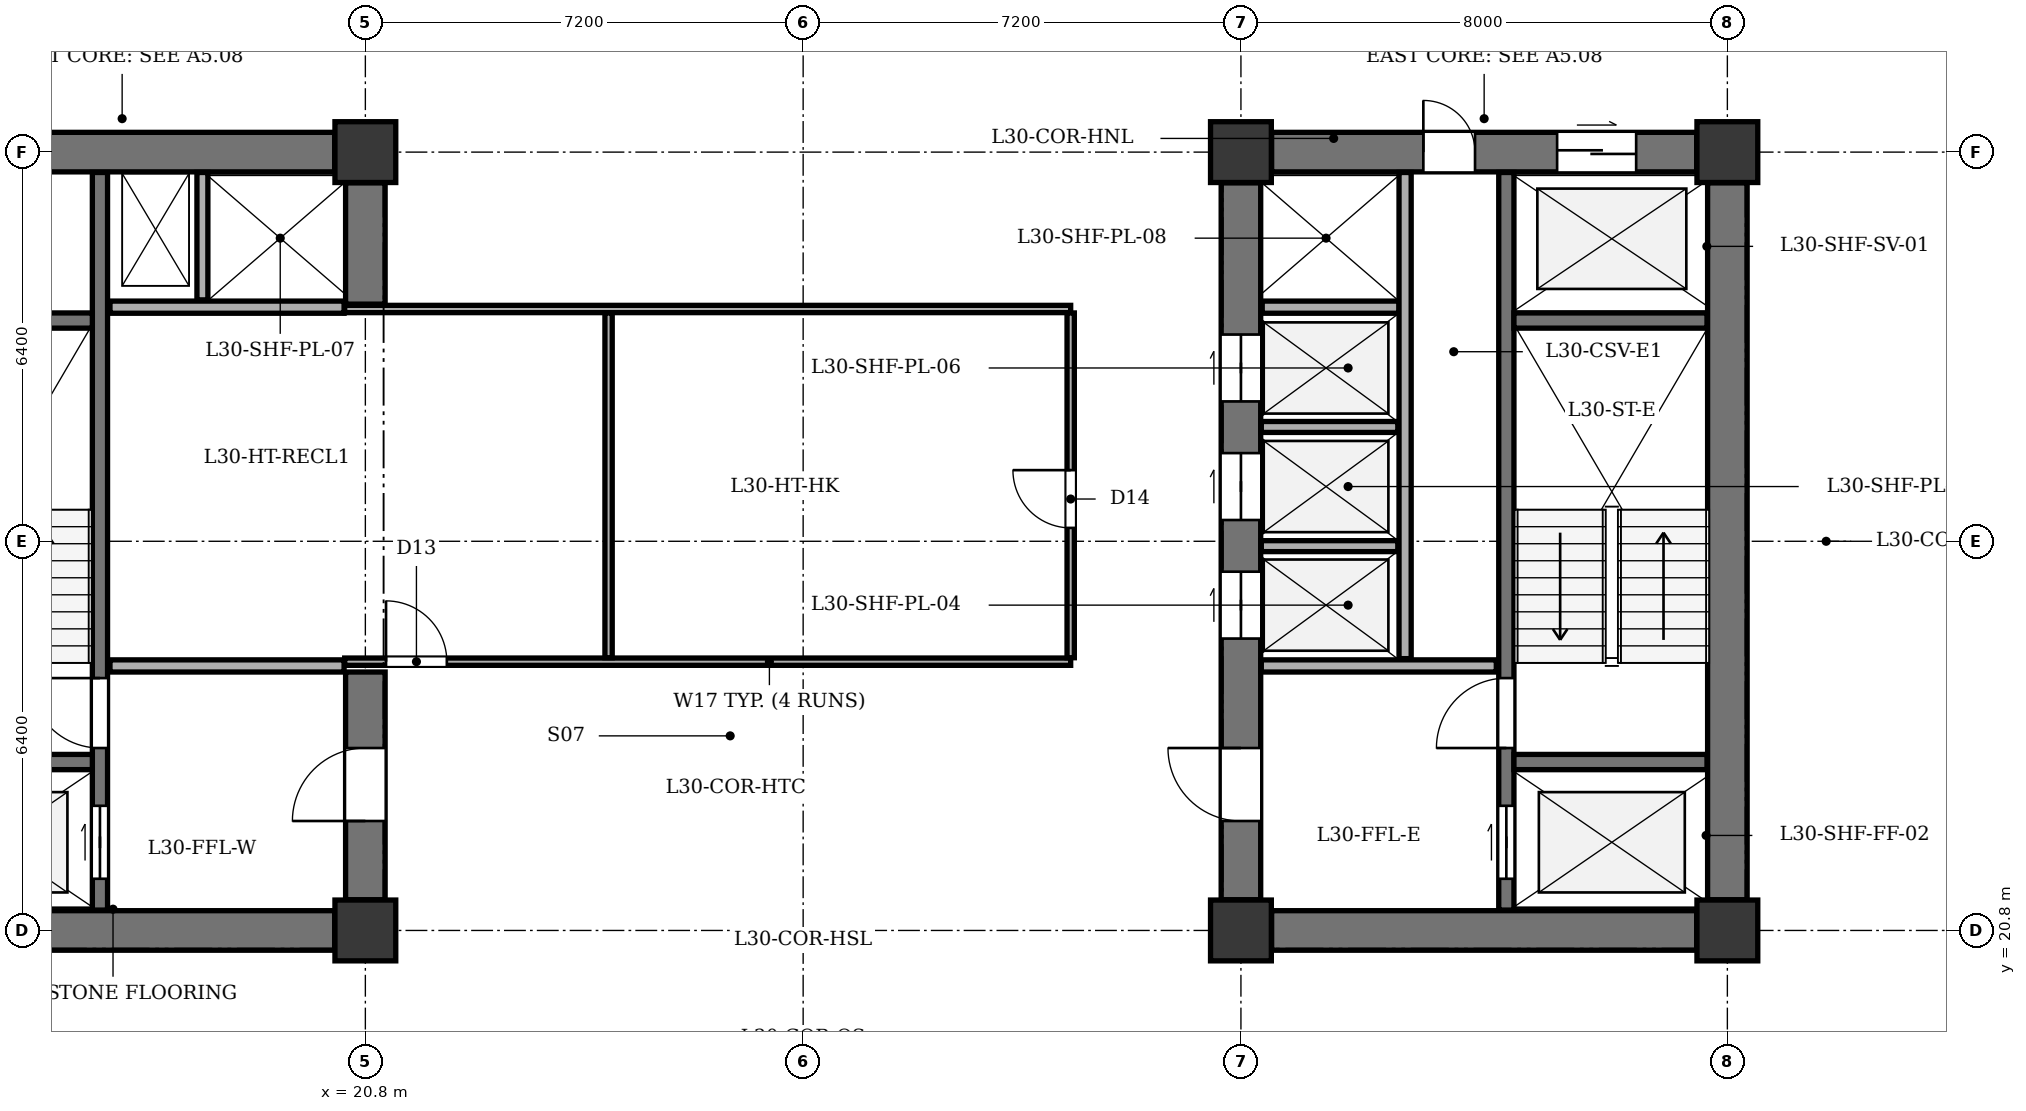
"""IFC4 building model, lengths in metres.
Left out: names, types, materials, properties, quantities, classifications, styles, units other than length and angle.
Written with IfcOpenShell. Run it as: python <this file> out.ifc"""

import sys

from ifc_helpers import new_model, si_unit, direction, frame, frame_2d, origin, origin_2d, place, context, subcontext, project, spatial, rectangle, extrude, element, fill, save


model = new_model("IFC4")
c1 = context("Model", 3, precision=1e-05, world=origin(), true_north=direction((0.0, 1.0)))
c2 = subcontext(c1, "Body", "Model", "MODEL_VIEW")
j1 = project(units=[si_unit("LENGTHUNIT", "METRE"), si_unit("PLANEANGLEUNIT", "RADIAN")], contexts=[c1])
p1 = place(None, origin())
s1 = spatial("IfcSite", under=j1, at=p1, CompositionType="ELEMENT")
p2 = place(p1, origin())
s2 = spatial("IfcBuilding", under=s1, at=p2, CompositionType="ELEMENT")
p3 = place(p2, frame((0.0, 0.0, 123.8)))
s3 = spatial("IfcBuildingStorey", under=s2, at=p3, CompositionType="ELEMENT", Elevation=123.8)
for number, where, z_axis, x_axis in (
    (1, (20.8, 20.8, 0.0), (0.0, 0.0, 1.0), (1.0, 0.0, 0.0)),
    (2, (20.8, 33.6, 0.0), (0.0, 0.0, 1.0), (1.0, 0.0, 0.0)),
    (3, (35.2, 20.8, 0.0), (0.0, 0.0, 1.0), (1.0, 0.0, 0.0)),
    (4, (43.2, 20.8, 0.0), (0.0, 0.0, 1.0), (1.0, 0.0, 0.0)),
    (5, (35.2, 33.6, 0.0), (0.0, 0.0, 1.0), (1.0, 0.0, 0.0)),
    (6, (43.2, 33.6, 0.0), (0.0, 0.0, 1.0), (1.0, 0.0, 0.0)),
):
    element("IfcColumn", number, at=place(p3, frame(where, z_axis=z_axis, x_axis=x_axis)), inside=s3, PredefinedType="COLUMN", context=c2, shape_type="SweptSolid", body=[
        extrude(rectangle(XDim=1.0, YDim=1.0, at=origin_2d()), origin(), (0.0, 0.0, 1.0), 3.5),
    ])
p4 = place(p3, frame((13.305, 20.8, 0.0), z_axis=(0.0, 0.0, 1.0), x_axis=(1.0, 0.0, 0.0)))
e7 = element("IfcWall", 7, at=p4, inside=s3, PredefinedType="SHEAR", context=c2, shape_type="SweptSolid", body=[
    extrude(rectangle(XDim=6.99, YDim=0.65, at=frame_2d((3.495, 0.0))), origin(), (0.0, 0.0, 1.0), 3.2),
])
p5 = place(p3, frame((13.305, 33.6, 0.0), z_axis=(0.0, 0.0, 1.0), x_axis=(1.0, 0.0, 0.0)))
e8 = element("IfcWall", 8, at=p5, inside=s3, PredefinedType="SHEAR", context=c2, shape_type="SweptSolid", body=[
    extrude(rectangle(XDim=6.99, YDim=0.65, at=frame_2d((3.495, 0.0))), origin(), (0.0, 0.0, 1.0), 3.2),
])
p6 = place(p5, frame((1.095, 0.0, 0.0)))
e9 = element("IfcOpeningElement", 9, at=p6, cuts=e8, PredefinedType="OPENING", context=c2, shape_type="SweptSolid", body=[
    extrude(rectangle(XDim=0.85, YDim=2.02, at=frame_2d((0.425, 1.01))), frame((0.0, 0.335, 0.0), z_axis=(0.0, -1.0, 0.0), x_axis=(1.0, 0.0, 0.0)), (0.0, 0.0, 1.0), 0.67),
])
p7 = place(p3, frame((20.8, 21.305, 0.0), z_axis=(0.0, 0.0, 1.0), x_axis=(0.0, 1.0, 0.0)))
e10 = element("IfcWall", 10, at=p7, inside=s3, PredefinedType="SHEAR", context=c2, shape_type="SweptSolid", body=[
    extrude(rectangle(XDim=3.745, YDim=0.65, at=frame_2d((1.873, 0.0))), origin(), (0.0, 0.0, 1.0), 3.2),
])
p8 = place(p7, frame((1.295, 0.0, 0.0)))
e11 = element("IfcOpeningElement", 11, at=p8, cuts=e10, PredefinedType="OPENING", context=c2, shape_type="SweptSolid", body=[
    extrude(rectangle(XDim=1.2, YDim=2.15, at=frame_2d((0.6, 1.075))), frame((0.0, 0.335, 0.0), z_axis=(0.0, -1.0, 0.0), x_axis=(1.0, 0.0, 0.0)), (0.0, 0.0, 1.0), 0.67),
])
p9 = place(p3, frame((20.8, 31.1, 0.0), z_axis=(0.0, 0.0, 1.0), x_axis=(0.0, 1.0, 0.0)))
e12 = element("IfcWall", 12, at=p9, inside=s3, PredefinedType="SHEAR", context=c2, shape_type="SweptSolid", body=[
    extrude(rectangle(XDim=1.995, YDim=0.65, at=frame_2d((0.998, 0.0))), origin(), (0.0, 0.0, 1.0), 3.2),
])
p10 = place(p3, frame((16.435, 21.135, 0.0), z_axis=(0.0, 0.0, 1.0), x_axis=(0.0, 1.0, 0.0)))
e13 = element("IfcWall", 13, at=p10, inside=s3, PredefinedType="SHEAR", context=c2, shape_type="SweptSolid", body=[
    extrude(rectangle(XDim=12.13, YDim=0.25, at=frame_2d((6.065, 0.0))), origin(), (0.0, 0.0, 1.0), 3.2),
])
p11 = place(p10, frame((0.515, 0.0, 0.0)))
e14 = element("IfcOpeningElement", 14, at=p11, cuts=e13, PredefinedType="OPENING", context=c2, shape_type="SweptSolid", body=[
    extrude(rectangle(XDim=1.2, YDim=2.15, at=frame_2d((0.6, 1.075))), frame((0.0, 0.135, 0.0), z_axis=(0.0, -1.0, 0.0), x_axis=(1.0, 0.0, 0.0)), (0.0, 0.0, 1.0), 0.27),
])
p12 = place(p10, frame((2.665, 0.0, 0.0)))
e15 = element("IfcOpeningElement", 15, at=p12, cuts=e13, PredefinedType="OPENING", context=c2, shape_type="SweptSolid", body=[
    extrude(rectangle(XDim=1.15, YDim=2.15, at=frame_2d((0.575, 1.075))), frame((0.0, 0.135, 0.0), z_axis=(0.0, -1.0, 0.0), x_axis=(1.0, 0.0, 0.0)), (0.0, 0.0, 1.0), 0.27),
])
for number, where, z_axis, x_axis in (
    (16, (13.135, 23.57, 0.0), (0.0, 0.0, 1.0), (1.0, 0.0, 0.0)),
    (17, (13.135, 30.83, 0.0), (0.0, 0.0, 1.0), (1.0, 0.0, 0.0)),
):
    element("IfcWall", number, at=place(p3, frame(where, z_axis=z_axis, x_axis=x_axis)), inside=s3, PredefinedType="SHEAR", context=c2, shape_type="SweptSolid", body=[
        extrude(rectangle(XDim=3.175, YDim=0.25, at=frame_2d((1.587, 0.0))), origin(), (0.0, 0.0, 1.0), 3.2),
    ])
for number, where, z_axis, x_axis in (
    (18, (16.6, 25.15, 0.0), (0.0, 0.0, 1.0), (1.0, 0.0, 0.0)),
    (19, (16.6, 31.05, 0.0), (0.0, 0.0, 1.0), (1.0, 0.0, 0.0)),
):
    element("IfcWall", number, at=place(p3, frame(where, z_axis=z_axis, x_axis=x_axis)), inside=s3, PredefinedType="SOLIDWALL", context=c2, shape_type="SweptSolid", body=[
        extrude(rectangle(XDim=3.85, YDim=0.2, at=frame_2d((1.925, 0.0))), origin(), (0.0, 0.0, 1.0), 3.2),
    ])
p13 = place(p3, frame((18.12, 31.17, 0.0), z_axis=(0.0, 0.0, 1.0), x_axis=(0.0, 1.0, 0.0)))
e20 = element("IfcWall", 20, at=p13, inside=s3, PredefinedType="PARTITIONING", context=c2, shape_type="SweptSolid", body=[
    extrude(rectangle(XDim=2.095, YDim=0.18, at=frame_2d((1.047, 0.0))), origin(), (0.0, 0.0, 1.0), 3.2),
])
p14 = place(p3, frame((43.2, 21.305, 0.0), z_axis=(0.0, 0.0, 1.0), x_axis=(0.0, 1.0, 0.0)))
e21 = element("IfcWall", 21, at=p14, inside=s3, PredefinedType="SHEAR", context=c2, shape_type="SweptSolid", body=[
    extrude(rectangle(XDim=11.79, YDim=0.65, at=frame_2d((5.895, 0.0))), origin(), (0.0, 0.0, 1.0), 3.2),
])
p15 = place(p3, frame((35.705, 20.8, 0.0), z_axis=(0.0, 0.0, 1.0), x_axis=(1.0, 0.0, 0.0)))
e22 = element("IfcWall", 22, at=p15, inside=s3, PredefinedType="SHEAR", context=c2, shape_type="SweptSolid", body=[
    extrude(rectangle(XDim=6.99, YDim=0.65, at=frame_2d((3.495, 0.0))), origin(), (0.0, 0.0, 1.0), 3.2),
])
p16 = place(p3, frame((35.705, 33.6, 0.0), z_axis=(0.0, 0.0, 1.0), x_axis=(1.0, 0.0, 0.0)))
e23 = element("IfcWall", 23, at=p16, inside=s3, PredefinedType="SHEAR", context=c2, shape_type="SweptSolid", body=[
    extrude(rectangle(XDim=6.99, YDim=0.65, at=frame_2d((3.495, 0.0))), origin(), (0.0, 0.0, 1.0), 3.2),
])
p17 = place(p16, frame((4.695, 0.0, 0.0)))
e24 = element("IfcOpeningElement", 24, at=p17, cuts=e23, PredefinedType="OPENING", context=c2, shape_type="SweptSolid", body=[
    extrude(rectangle(XDim=1.3, YDim=2.15, at=frame_2d((0.65, 1.075))), frame((0.0, 0.335, 0.0), z_axis=(0.0, -1.0, 0.0), x_axis=(1.0, 0.0, 0.0)), (0.0, 0.0, 1.0), 0.67),
])
p18 = place(p16, frame((2.495, 0.0, 0.0)))
e25 = element("IfcOpeningElement", 25, at=p18, cuts=e23, PredefinedType="OPENING", context=c2, shape_type="SweptSolid", body=[
    extrude(rectangle(XDim=0.85, YDim=2.02, at=frame_2d((0.425, 1.01))), frame((0.0, 0.335, 0.0), z_axis=(0.0, -1.0, 0.0), x_axis=(1.0, 0.0, 0.0)), (0.0, 0.0, 1.0), 0.67),
])
p19 = place(p3, frame((35.2, 21.305, 0.0), z_axis=(0.0, 0.0, 1.0), x_axis=(0.0, 1.0, 0.0)))
e26 = element("IfcWall", 26, at=p19, inside=s3, PredefinedType="SHEAR", context=c2, shape_type="SweptSolid", body=[
    extrude(rectangle(XDim=11.79, YDim=0.65, at=frame_2d((5.895, 0.0))), origin(), (0.0, 0.0, 1.0), 3.2),
])
p20 = place(p19, frame((1.295, 0.0, 0.0)))
e27 = element("IfcOpeningElement", 27, at=p20, cuts=e26, PredefinedType="OPENING", context=c2, shape_type="SweptSolid", body=[
    extrude(rectangle(XDim=1.2, YDim=2.15, at=frame_2d((0.6, 1.075))), frame((0.0, 0.335, 0.0), z_axis=(0.0, -1.0, 0.0), x_axis=(1.0, 0.0, 0.0)), (0.0, 0.0, 1.0), 0.67),
])
p21 = place(p19, frame((4.295, 0.0, 0.0)))
e28 = element("IfcOpeningElement", 28, at=p21, cuts=e26, PredefinedType="OPENING", context=c2, shape_type="SweptSolid", body=[
    extrude(rectangle(XDim=1.1, YDim=2.1, at=frame_2d((0.55, 1.05))), frame((0.0, 0.335, 0.0), z_axis=(0.0, -1.0, 0.0), x_axis=(1.0, 0.0, 0.0)), (0.0, 0.0, 1.0), 0.67),
])
p22 = place(p19, frame((6.245, 0.0, 0.0)))
e29 = element("IfcOpeningElement", 29, at=p22, cuts=e26, PredefinedType="OPENING", context=c2, shape_type="SweptSolid", body=[
    extrude(rectangle(XDim=1.1, YDim=2.1, at=frame_2d((0.55, 1.05))), frame((0.0, 0.335, 0.0), z_axis=(0.0, -1.0, 0.0), x_axis=(1.0, 0.0, 0.0)), (0.0, 0.0, 1.0), 0.67),
])
p23 = place(p19, frame((8.195, 0.0, 0.0)))
e30 = element("IfcOpeningElement", 30, at=p23, cuts=e26, PredefinedType="OPENING", context=c2, shape_type="SweptSolid", body=[
    extrude(rectangle(XDim=1.1, YDim=2.1, at=frame_2d((0.55, 1.05))), frame((0.0, 0.335, 0.0), z_axis=(0.0, -1.0, 0.0), x_axis=(1.0, 0.0, 0.0)), (0.0, 0.0, 1.0), 0.67),
])
p24 = place(p3, frame((39.565, 21.135, 0.0), z_axis=(0.0, 0.0, 1.0), x_axis=(0.0, 1.0, 0.0)))
e31 = element("IfcWall", 31, at=p24, inside=s3, PredefinedType="SHEAR", context=c2, shape_type="SweptSolid", body=[
    extrude(rectangle(XDim=12.13, YDim=0.25, at=frame_2d((6.065, 0.0))), origin(), (0.0, 0.0, 1.0), 3.2),
])
p25 = place(p24, frame((0.515, 0.0, 0.0)))
e32 = element("IfcOpeningElement", 32, at=p25, cuts=e31, PredefinedType="OPENING", context=c2, shape_type="SweptSolid", body=[
    extrude(rectangle(XDim=1.2, YDim=2.15, at=frame_2d((0.6, 1.075))), frame((0.0, 0.135, 0.0), z_axis=(0.0, -1.0, 0.0), x_axis=(1.0, 0.0, 0.0)), (0.0, 0.0, 1.0), 0.27),
])
p26 = place(p24, frame((2.665, 0.0, 0.0)))
e33 = element("IfcOpeningElement", 33, at=p26, cuts=e31, PredefinedType="OPENING", context=c2, shape_type="SweptSolid", body=[
    extrude(rectangle(XDim=1.15, YDim=2.15, at=frame_2d((0.575, 1.075))), frame((0.0, 0.135, 0.0), z_axis=(0.0, -1.0, 0.0), x_axis=(1.0, 0.0, 0.0)), (0.0, 0.0, 1.0), 0.27),
])
for number, where, z_axis, x_axis in (
    (34, (39.69, 23.57, 0.0), (0.0, 0.0, 1.0), (1.0, 0.0, 0.0)),
    (35, (39.69, 30.83, 0.0), (0.0, 0.0, 1.0), (1.0, 0.0, 0.0)),
):
    element("IfcWall", number, at=place(p3, frame(where, z_axis=z_axis, x_axis=x_axis)), inside=s3, PredefinedType="SHEAR", context=c2, shape_type="SweptSolid", body=[
        extrude(rectangle(XDim=3.175, YDim=0.25, at=frame_2d((1.587, 0.0))), origin(), (0.0, 0.0, 1.0), 3.2),
    ])
p27 = place(p3, frame((35.535, 25.15, 0.0), z_axis=(0.0, 0.0, 1.0), x_axis=(1.0, 0.0, 0.0)))
e36 = element("IfcWall", 36, at=p27, inside=s3, PredefinedType="SOLIDWALL", context=c2, shape_type="SweptSolid", body=[
    extrude(rectangle(XDim=3.865, YDim=0.2, at=frame_2d((1.933, 0.0))), origin(), (0.0, 0.0, 1.0), 3.2),
])
p28 = place(p3, frame((35.55, 31.05, 0.0), z_axis=(0.0, 0.0, 1.0), x_axis=(1.0, 0.0, 0.0)))
e37 = element("IfcWall", 37, at=p28, inside=s3, PredefinedType="SOLIDWALL", context=c2, shape_type="SweptSolid", body=[
    extrude(rectangle(XDim=2.25, YDim=0.2, at=frame_2d((1.125, 0.0))), origin(), (0.0, 0.0, 1.0), 3.2),
])
p29 = place(p3, frame((37.9, 25.27, 0.0), z_axis=(0.0, 0.0, 1.0), x_axis=(0.0, 1.0, 0.0)))
e38 = element("IfcWall", 38, at=p29, inside=s3, PredefinedType="SOLIDWALL", context=c2, shape_type="SweptSolid", body=[
    extrude(rectangle(XDim=7.995, YDim=0.2, at=frame_2d((3.998, 0.0))), origin(), (0.0, 0.0, 1.0), 3.2),
])
for number, where, z_axis, x_axis in (
    (39, (35.535, 27.12, 0.0), (0.0, 0.0, 1.0), (1.0, 0.0, 0.0)),
    (40, (35.535, 29.08, 0.0), (0.0, 0.0, 1.0), (1.0, 0.0, 0.0)),
):
    element("IfcWall", number, at=place(p3, frame(where, z_axis=z_axis, x_axis=x_axis)), inside=s3, PredefinedType="PARTITIONING", context=c2, shape_type="SweptSolid", body=[
        extrude(rectangle(XDim=2.245, YDim=0.18, at=frame_2d((1.123, 0.0))), origin(), (0.0, 0.0, 1.0), 3.2),
    ])
p30 = place(p3, frame((20.46, 25.22, 0.0), z_axis=(0.0, 0.0, 1.0), x_axis=(1.0, 0.0, 0.0)))
e41 = element("IfcWall", 41, at=p30, inside=s3, PredefinedType="PARTITIONING", context=c2, shape_type="SweptSolid", body=[
    extrude(rectangle(XDim=11.94, YDim=0.12, at=frame_2d((5.97, 0.0))), origin(), (0.0, 0.0, 1.0), 3.2),
])
p31 = place(p30, frame((0.68, 0.0, 0.0)))
e42 = element("IfcOpeningElement", 42, at=p31, cuts=e41, PredefinedType="OPENING", context=c2, shape_type="SweptSolid", body=[
    extrude(rectangle(XDim=1.0, YDim=2.1, at=frame_2d((0.5, 1.05))), frame((0.0, 0.07, 0.0), z_axis=(0.0, -1.0, 0.0), x_axis=(1.0, 0.0, 0.0)), (0.0, 0.0, 1.0), 0.14),
])
p32 = place(p3, frame((20.46, 31.02, 0.0), z_axis=(0.0, 0.0, 1.0), x_axis=(1.0, 0.0, 0.0)))
e43 = element("IfcWall", 43, at=p32, inside=s3, PredefinedType="PARTITIONING", context=c2, shape_type="SweptSolid", body=[
    extrude(rectangle(XDim=11.94, YDim=0.12, at=frame_2d((5.97, 0.0))), origin(), (0.0, 0.0, 1.0), 3.2),
])
p33 = place(p3, frame((32.4, 25.285, 0.0), z_axis=(0.0, 0.0, 1.0), x_axis=(0.0, 1.0, 0.0)))
e44 = element("IfcWall", 44, at=p33, inside=s3, PredefinedType="PARTITIONING", context=c2, shape_type="SweptSolid", body=[
    extrude(rectangle(XDim=5.67, YDim=0.12, at=frame_2d((2.835, 0.0))), origin(), (0.0, 0.0, 1.0), 3.2),
])
p34 = place(p33, frame((2.135, 0.0, 0.0)))
e45 = element("IfcOpeningElement", 45, at=p34, cuts=e44, PredefinedType="OPENING", context=c2, shape_type="SweptSolid", body=[
    extrude(rectangle(XDim=0.95, YDim=2.1, at=frame_2d((0.475, 1.05))), frame((0.0, 0.07, 0.0), z_axis=(0.0, -1.0, 0.0), x_axis=(1.0, 0.0, 0.0)), (0.0, 0.0, 1.0), 0.14),
])
p35 = place(p3, frame((24.8, 25.285, 0.0), z_axis=(0.0, 0.0, 1.0), x_axis=(0.0, 1.0, 0.0)))
e46 = element("IfcWall", 46, at=p35, inside=s3, PredefinedType="PARTITIONING", context=c2, shape_type="SweptSolid", body=[
    extrude(rectangle(XDim=5.67, YDim=0.12, at=frame_2d((2.835, 0.0))), origin(), (0.0, 0.0, 1.0), 3.2),
])
p36 = place(p8, origin())
e47 = element("IfcDoor", 47, at=p36, inside=s3, OperationType="SINGLE_SWING_LEFT", PredefinedType="DOOR", context=c2, shape_type="SweptSolid", body=[
    extrude(rectangle(XDim=1.2, YDim=2.15, at=frame_2d((0.6, 1.075))), frame((0.0, 0.025, 0.0), z_axis=(0.0, -1.0, 0.0), x_axis=(1.0, 0.0, 0.0)), (0.0, 0.0, 1.0), 0.05),
])
fill(e11, e47)
p37 = place(p11, origin())
e48 = element("IfcDoor", 48, at=p37, inside=s3, OperationType="DOUBLE_DOOR_SLIDING", PredefinedType="DOOR", context=c2, shape_type="SweptSolid", body=[
    extrude(rectangle(XDim=1.2, YDim=2.15, at=frame_2d((0.6, 1.075))), frame((0.0, 0.025, 0.0), z_axis=(0.0, -1.0, 0.0), x_axis=(1.0, 0.0, 0.0)), (0.0, 0.0, 1.0), 0.05),
])
fill(e14, e48)
p38 = place(p12, origin())
e49 = element("IfcDoor", 49, at=p38, inside=s3, OperationType="SINGLE_SWING_RIGHT", PredefinedType="DOOR", context=c2, shape_type="SweptSolid", body=[
    extrude(rectangle(XDim=1.15, YDim=2.15, at=frame_2d((0.575, 1.075))), frame((0.0, 0.025, 0.0), z_axis=(0.0, -1.0, 0.0), x_axis=(1.0, 0.0, 0.0)), (0.0, 0.0, 1.0), 0.05),
])
fill(e15, e49)
p39 = place(p17, origin())
e50 = element("IfcDoor", 50, at=p39, inside=s3, OperationType="DOUBLE_DOOR_SLIDING", PredefinedType="DOOR", context=c2, shape_type="SweptSolid", body=[
    extrude(rectangle(XDim=1.3, YDim=2.15, at=frame_2d((0.65, 1.075))), frame((0.0, 0.025, 0.0), z_axis=(0.0, -1.0, 0.0), x_axis=(1.0, 0.0, 0.0)), (0.0, 0.0, 1.0), 0.05),
])
fill(e24, e50)
p40 = place(p18, origin())
e51 = element("IfcDoor", 51, at=p40, inside=s3, OperationType="SINGLE_SWING_LEFT", PredefinedType="DOOR", context=c2, shape_type="SweptSolid", body=[
    extrude(rectangle(XDim=0.85, YDim=2.02, at=frame_2d((0.425, 1.01))), frame((0.0, 0.025, 0.0), z_axis=(0.0, -1.0, 0.0), x_axis=(1.0, 0.0, 0.0)), (0.0, 0.0, 1.0), 0.05),
])
fill(e25, e51)
p41 = place(p20, origin())
e52 = element("IfcDoor", 52, at=p41, inside=s3, OperationType="SINGLE_SWING_RIGHT", PredefinedType="DOOR", context=c2, shape_type="SweptSolid", body=[
    extrude(rectangle(XDim=1.2, YDim=2.15, at=frame_2d((0.6, 1.075))), frame((0.0, 0.025, 0.0), z_axis=(0.0, -1.0, 0.0), x_axis=(1.0, 0.0, 0.0)), (0.0, 0.0, 1.0), 0.05),
])
fill(e27, e52)
p42 = place(p21, origin())
e53 = element("IfcDoor", 53, at=p42, inside=s3, OperationType="DOUBLE_DOOR_SLIDING", PredefinedType="DOOR", context=c2, shape_type="SweptSolid", body=[
    extrude(rectangle(XDim=1.1, YDim=2.1, at=frame_2d((0.55, 1.05))), frame((0.0, 0.025, 0.0), z_axis=(0.0, -1.0, 0.0), x_axis=(1.0, 0.0, 0.0)), (0.0, 0.0, 1.0), 0.05),
])
fill(e28, e53)
p43 = place(p22, origin())
e54 = element("IfcDoor", 54, at=p43, inside=s3, OperationType="DOUBLE_DOOR_SLIDING", PredefinedType="DOOR", context=c2, shape_type="SweptSolid", body=[
    extrude(rectangle(XDim=1.1, YDim=2.1, at=frame_2d((0.55, 1.05))), frame((0.0, 0.025, 0.0), z_axis=(0.0, -1.0, 0.0), x_axis=(1.0, 0.0, 0.0)), (0.0, 0.0, 1.0), 0.05),
])
fill(e29, e54)
p44 = place(p23, origin())
e55 = element("IfcDoor", 55, at=p44, inside=s3, OperationType="DOUBLE_DOOR_SLIDING", PredefinedType="DOOR", context=c2, shape_type="SweptSolid", body=[
    extrude(rectangle(XDim=1.1, YDim=2.1, at=frame_2d((0.55, 1.05))), frame((0.0, 0.025, 0.0), z_axis=(0.0, -1.0, 0.0), x_axis=(1.0, 0.0, 0.0)), (0.0, 0.0, 1.0), 0.05),
])
fill(e30, e55)
p45 = place(p25, origin())
e56 = element("IfcDoor", 56, at=p45, inside=s3, OperationType="DOUBLE_DOOR_SLIDING", PredefinedType="DOOR", context=c2, shape_type="SweptSolid", body=[
    extrude(rectangle(XDim=1.2, YDim=2.15, at=frame_2d((0.6, 1.075))), frame((0.0, 0.025, 0.0), z_axis=(0.0, -1.0, 0.0), x_axis=(1.0, 0.0, 0.0)), (0.0, 0.0, 1.0), 0.05),
])
fill(e32, e56)
p46 = place(p26, origin())
e57 = element("IfcDoor", 57, at=p46, inside=s3, OperationType="SINGLE_SWING_LEFT", PredefinedType="DOOR", context=c2, shape_type="SweptSolid", body=[
    extrude(rectangle(XDim=1.15, YDim=2.15, at=frame_2d((0.575, 1.075))), frame((0.0, 0.025, 0.0), z_axis=(0.0, -1.0, 0.0), x_axis=(1.0, 0.0, 0.0)), (0.0, 0.0, 1.0), 0.05),
])
fill(e33, e57)
p47 = place(p31, origin())
e58 = element("IfcDoor", 58, at=p47, inside=s3, OperationType="SINGLE_SWING_LEFT", PredefinedType="DOOR", context=c2, shape_type="SweptSolid", body=[
    extrude(rectangle(XDim=1.0, YDim=2.1, at=frame_2d((0.5, 1.05))), frame((0.0, 0.025, 0.0), z_axis=(0.0, -1.0, 0.0), x_axis=(1.0, 0.0, 0.0)), (0.0, 0.0, 1.0), 0.05),
])
fill(e42, e58)
p48 = place(p34, origin())
e59 = element("IfcDoor", 59, at=p48, inside=s3, OperationType="SINGLE_SWING_RIGHT", PredefinedType="DOOR", context=c2, shape_type="SweptSolid", body=[
    extrude(rectangle(XDim=0.95, YDim=2.1, at=frame_2d((0.475, 1.05))), frame((0.0, 0.025, 0.0), z_axis=(0.0, -1.0, 0.0), x_axis=(1.0, 0.0, 0.0)), (0.0, 0.0, 1.0), 0.05),
])
fill(e45, e59)
save(model, sys.argv[1])
